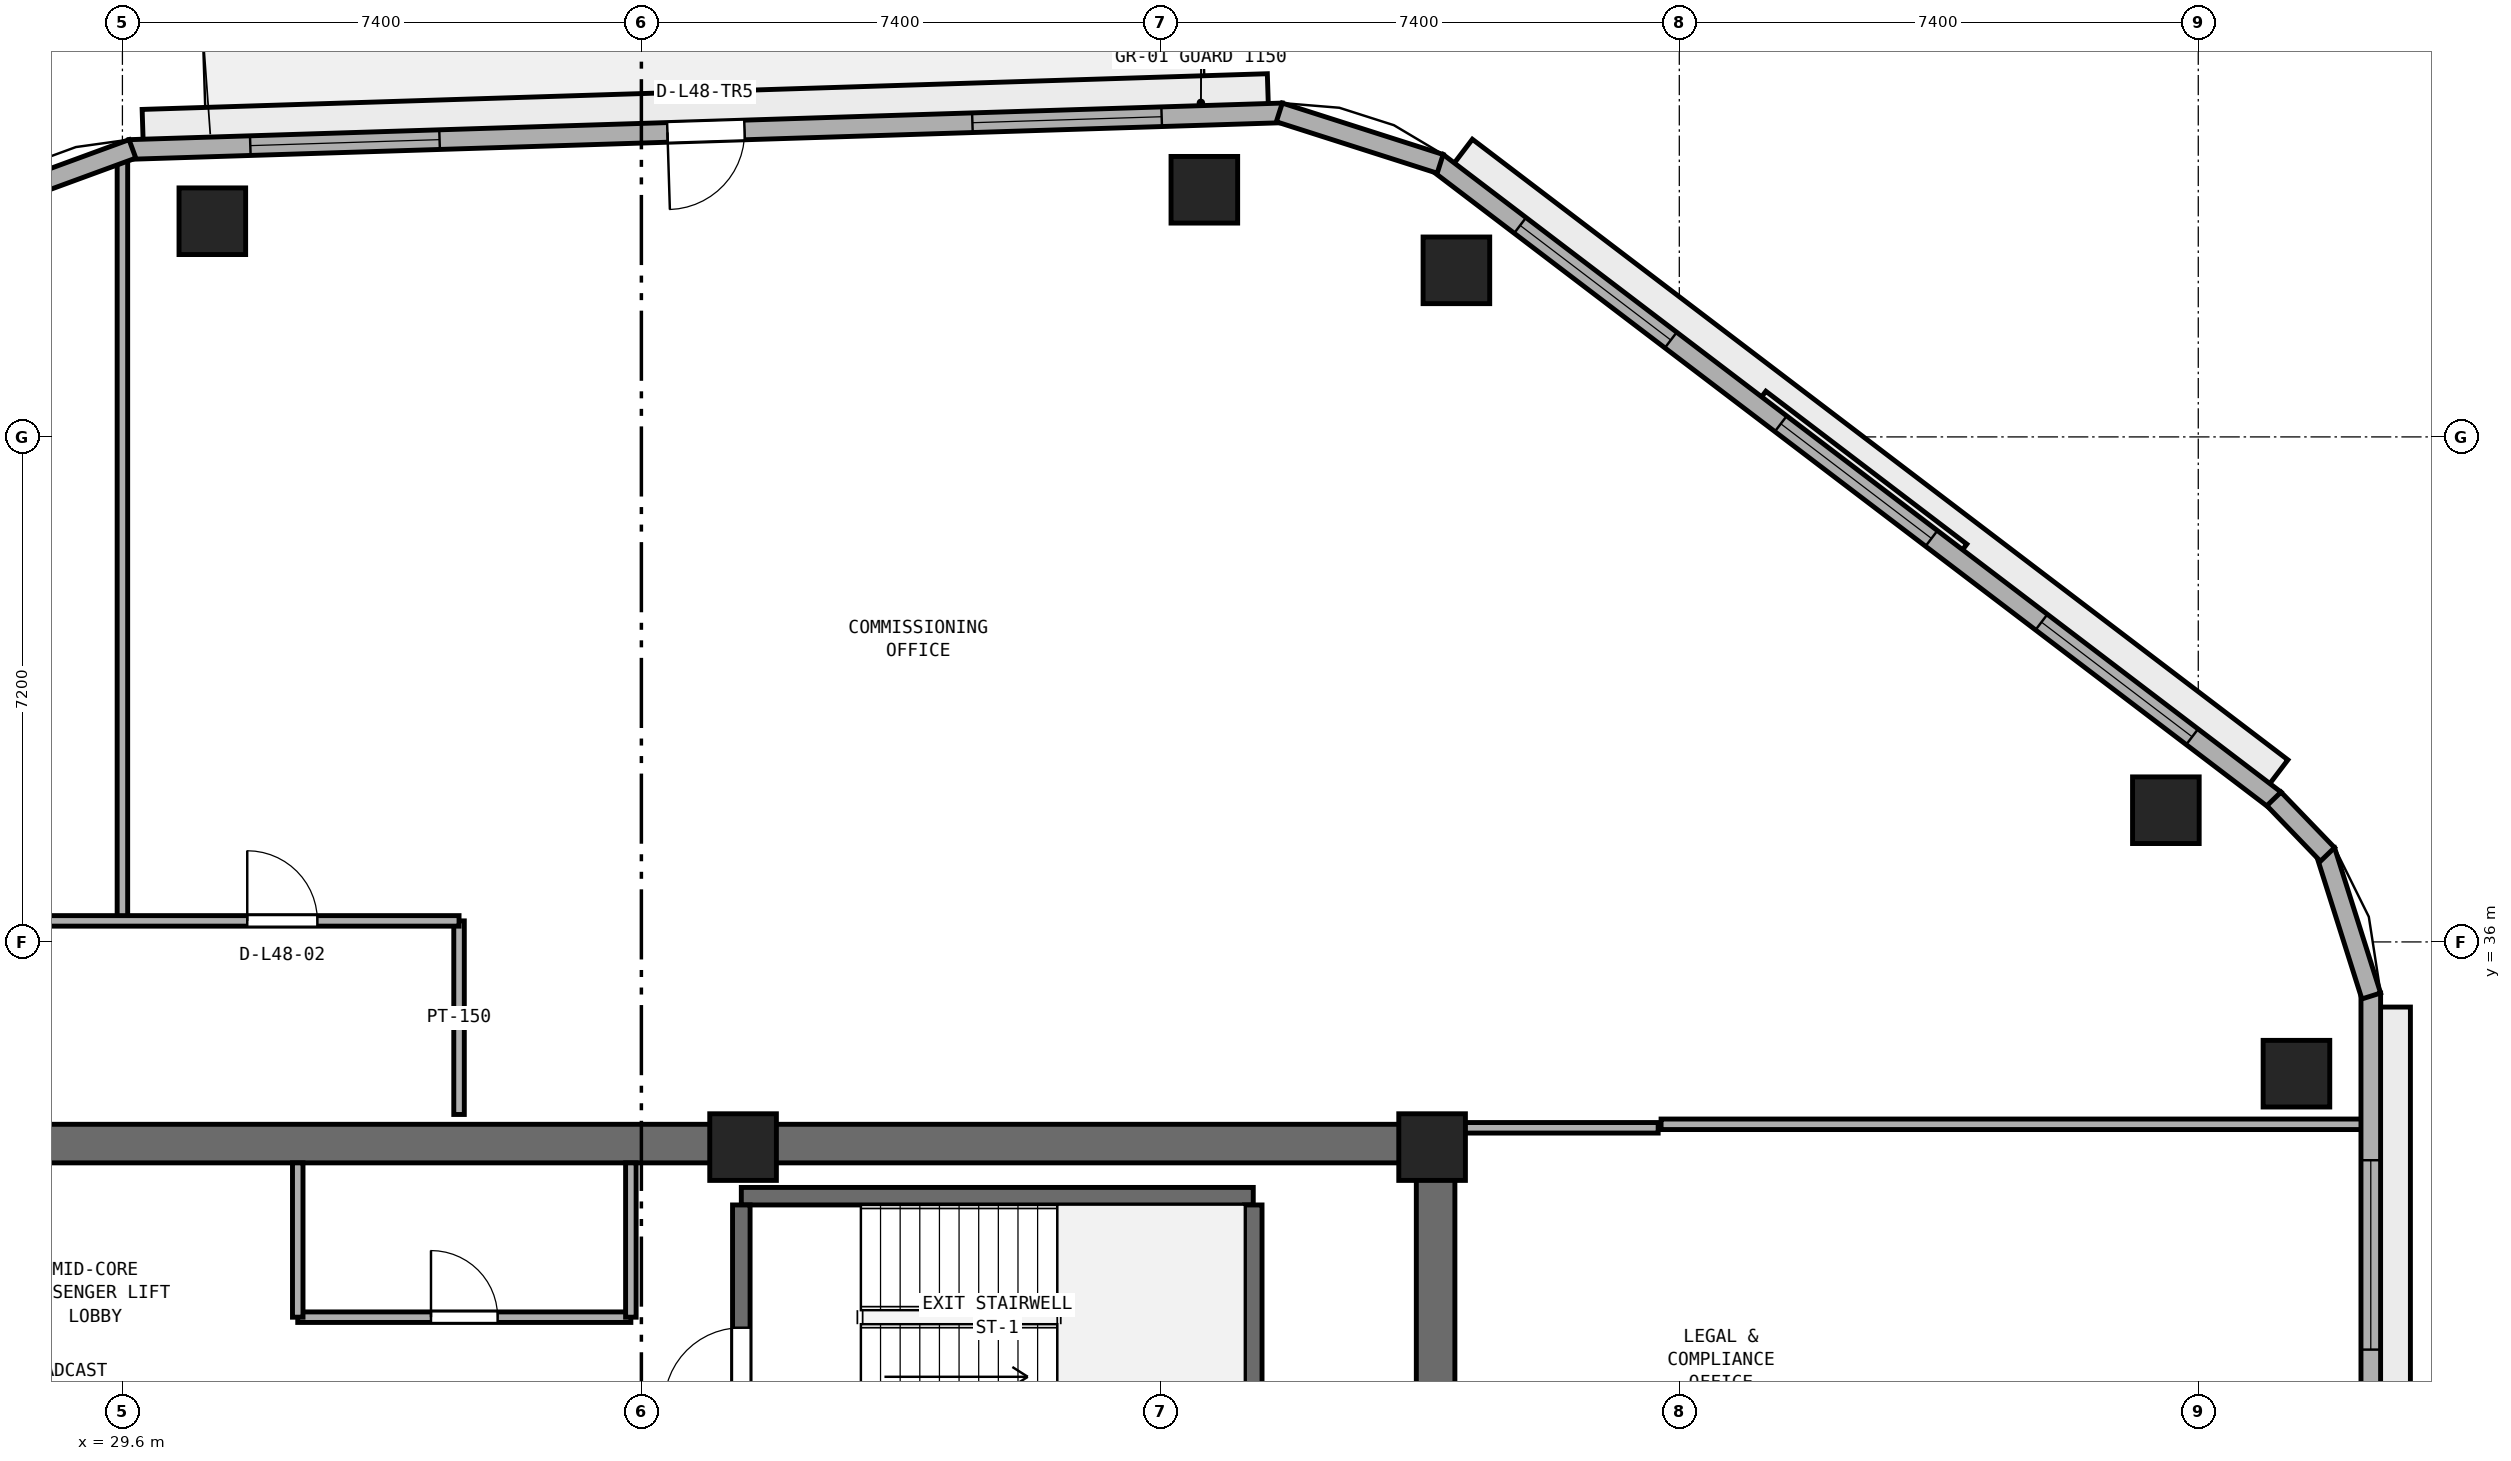
"""IFC4 building model, lengths in metres.
Left out: names, types, materials, properties, quantities, classifications, styles, units other than length and angle.
Written with IfcOpenShell. Run it as: python <this file> out.ifc"""

import sys

from ifc_helpers import new_model, si_unit, direction, frame, frame_2d, origin, origin_2d, place, context, subcontext, project, spatial, rectangle, extrude, element, fill, save


model = new_model("IFC4")
c1 = context("Model", 3, precision=1e-05, world=origin(), true_north=direction((0.0, 1.0)))
c2 = subcontext(c1, "Body", "Model", "MODEL_VIEW")
j1 = project(units=[si_unit("LENGTHUNIT", "METRE"), si_unit("PLANEANGLEUNIT", "RADIAN")], contexts=[c1])
p1 = place(None, origin())
s1 = spatial("IfcSite", under=j1, at=p1, CompositionType="ELEMENT")
p2 = place(p1, origin())
s2 = spatial("IfcBuilding", under=s1, at=p2, CompositionType="ELEMENT")
p3 = place(p2, frame((0.0, 0.0, 189.6)))
s3 = spatial("IfcBuildingStorey", under=s2, at=p3, CompositionType="ELEMENT", Elevation=189.6)
p4 = place(p3, frame((25.4, 33.125, 0.0), z_axis=(0.0, 0.0, 1.0), x_axis=(1.0, 0.0, 0.0)))
e1 = element("IfcWall", 1, at=p4, inside=s3, PredefinedType="SHEAR", context=c2, shape_type="SweptSolid", body=[
    extrude(rectangle(XDim=23.2, YDim=0.55, at=frame_2d((11.6, 0.0))), origin(), (0.0, 0.0, 1.0), 3.54),
])
p5 = place(p3, frame((48.325, 17.55, 0.0), z_axis=(0.0, 0.0, 1.0), x_axis=(0.0, 1.0, 0.0)))
e2 = element("IfcWall", 2, at=p5, inside=s3, PredefinedType="SHEAR", context=c2, shape_type="SweptSolid", body=[
    extrude(rectangle(XDim=15.3, YDim=0.55, at=frame_2d((7.65, 0.0))), origin(), (0.0, 0.0, 1.0), 3.54),
])
p6 = place(p5, frame((5.75, 0.0, 0.0)))
e3 = element("IfcOpeningElement", 3, at=p6, cuts=e2, PredefinedType="OPENING", context=c2, shape_type="SweptSolid", body=[
    extrude(rectangle(XDim=1.5, YDim=2.15, at=frame_2d((0.75, 1.075))), frame((0.0, 0.285, 0.0), z_axis=(0.0, -1.0, 0.0), x_axis=(1.0, 0.0, 0.0)), (0.0, 0.0, 1.0), 0.57),
])
for number, where, z_axis, x_axis in (
    (4, (48.275, 33.075, 0.0), (0.0, 0.0, 1.0), (1.0, 0.0, 0.0)),
    (5, (38.45, 33.075, 0.0), (0.0, 0.0, 1.0), (1.0, 0.0, 0.0)),
):
    element("IfcColumn", number, at=place(p3, frame(where, z_axis=z_axis, x_axis=x_axis)), inside=s3, PredefinedType="PILASTER", context=c2, shape_type="SweptSolid", body=[
        extrude(rectangle(XDim=0.95, YDim=0.95, at=origin_2d()), origin(), (0.0, 0.0, 1.0), 3.8),
    ])
for number, where, z_axis, x_axis in (
    (6, (60.6, 34.122, 0.0), (0.0, 0.0, 1.0), (1.0, 0.0, 0.0)),
    (7, (58.738, 37.878, 0.0), (0.0, 0.0, 1.0), (1.0, 0.0, 0.0)),
    (8, (48.622, 45.575, 0.0), (0.0, 0.0, 1.0), (1.0, 0.0, 0.0)),
    (9, (45.028, 46.724, 0.0), (0.0, 0.0, 1.0), (1.0, 0.0, 0.0)),
    (10, (30.882, 46.275, 0.0), (0.0, 0.0, 1.0), (1.0, 0.0, 0.0)),
):
    element("IfcColumn", number, at=place(p3, frame(where, z_axis=z_axis, x_axis=x_axis)), inside=s3, PredefinedType="COLUMN", context=c2, shape_type="SweptSolid", body=[
        extrude(rectangle(XDim=0.95, YDim=0.95, at=origin_2d()), origin(), (0.0, 0.0, 1.0), 3.8),
    ])
p7 = place(p3, frame((38.425, 32.375, 0.0), z_axis=(0.0, 0.0, 1.0), x_axis=(1.0, 0.0, 0.0)))
e11 = element("IfcWall", 11, at=p7, inside=s3, PredefinedType="SHEAR", context=c2, shape_type="SweptSolid", body=[
    extrude(rectangle(XDim=7.3, YDim=0.25, at=frame_2d((3.65, 0.0))), origin(), (0.0, 0.0, 1.0), 3.54),
])
p8 = place(p3, frame((38.425, 29.05, 0.0), z_axis=(0.0, 0.0, 1.0), x_axis=(0.0, 1.0, 0.0)))
e12 = element("IfcWall", 12, at=p8, inside=s3, PredefinedType="SHEAR", context=c2, shape_type="SweptSolid", body=[
    extrude(rectangle(XDim=3.2, YDim=0.25, at=frame_2d((1.6, 0.0))), origin(), (0.0, 0.0, 1.0), 3.54),
])
p9 = place(p8, frame((0.35, 0.0, 0.0)))
e13 = element("IfcOpeningElement", 13, at=p9, cuts=e12, PredefinedType="OPENING", context=c2, shape_type="SweptSolid", body=[
    extrude(rectangle(XDim=1.1, YDim=2.15, at=frame_2d((0.55, 1.075))), frame((0.0, 0.135, 0.0), z_axis=(0.0, -1.0, 0.0), x_axis=(1.0, 0.0, 0.0)), (0.0, 0.0, 1.0), 0.27),
])
p10 = place(p3, frame((45.725, 29.05, 0.0), z_axis=(0.0, 0.0, 1.0), x_axis=(0.0, 1.0, 0.0)))
e14 = element("IfcWall", 14, at=p10, inside=s3, PredefinedType="SHEAR", context=c2, shape_type="SweptSolid", body=[
    extrude(rectangle(XDim=3.2, YDim=0.25, at=frame_2d((1.6, 0.0))), origin(), (0.0, 0.0, 1.0), 3.54),
])
p11 = place(p3, frame((32.1, 30.65, 0.0), z_axis=(0.0, 0.0, 1.0), x_axis=(1.0, 0.0, 0.0)))
e15 = element("IfcWall", 15, at=p11, inside=s3, PredefinedType="PARTITIONING", context=c2, shape_type="SweptSolid", body=[
    extrude(rectangle(XDim=4.75, YDim=0.15, at=frame_2d((2.375, 0.0))), origin(), (0.0, 0.0, 1.0), 3.54),
])
p12 = place(p11, frame((1.9, 0.0, 0.0)))
e16 = element("IfcOpeningElement", 16, at=p12, cuts=e15, PredefinedType="OPENING", context=c2, shape_type="SweptSolid", body=[
    extrude(rectangle(XDim=0.95, YDim=2.1, at=frame_2d((0.475, 1.05))), frame((0.0, 0.085, 0.0), z_axis=(0.0, -1.0, 0.0), x_axis=(1.0, 0.0, 0.0)), (0.0, 0.0, 1.0), 0.17),
])
for number, where, z_axis, x_axis in (
    (17, (32.1, 30.65, 0.0), (0.0, 0.0, 1.0), (0.0, 1.0, 0.0)),
    (18, (36.85, 30.65, 0.0), (0.0, 0.0, 1.0), (0.0, 1.0, 0.0)),
):
    element("IfcWall", number, at=place(p3, frame(where, z_axis=z_axis, x_axis=x_axis)), inside=s3, PredefinedType="PARTITIONING", context=c2, shape_type="SweptSolid", body=[
        extrude(rectangle(XDim=2.2, YDim=0.15, at=frame_2d((1.1, 0.0))), origin(), (0.0, 0.0, 1.0), 3.54),
    ])
p13 = place(p3, frame((34.4, 33.54, 0.0), z_axis=(0.0, 0.0, 1.0), x_axis=(0.0, 1.0, 0.0)))
e19 = element("IfcWall", 19, at=p13, inside=s3, PredefinedType="PARTITIONING", context=c2, shape_type="SweptSolid", body=[
    extrude(rectangle(XDim=2.76, YDim=0.15, at=frame_2d((1.38, 0.0))), origin(), (0.0, 0.0, 1.0), 3.54),
])
p14 = place(p3, frame((29.6, 36.3, 0.0), z_axis=(0.0, 0.0, 1.0), x_axis=(0.0, 1.0, 0.0)))
e20 = element("IfcWall", 20, at=p14, inside=s3, PredefinedType="PARTITIONING", context=c2, shape_type="SweptSolid", body=[
    extrude(rectangle(XDim=10.919, YDim=0.15, at=frame_2d((5.46, 0.0))), origin(), (0.0, 0.0, 1.0), 3.54),
])
p15 = place(p3, frame((48.74, 33.35, 0.0), z_axis=(0.0, 0.0, 1.0), x_axis=(1.0, 0.0, 0.0)))
e21 = element("IfcWall", 21, at=p15, inside=s3, PredefinedType="PARTITIONING", context=c2, shape_type="SweptSolid", body=[
    extrude(rectangle(XDim=2.759, YDim=0.15, at=frame_2d((1.379, 0.0))), origin(), (0.0, 0.0, 1.0), 2.923),
])
p16 = place(p3, frame((51.54, 33.4, 0.0), z_axis=(0.0, 0.0, 1.0), x_axis=(1.0, 0.0, 0.0)))
e22 = element("IfcWall", 22, at=p16, inside=s3, PredefinedType="PARTITIONING", context=c2, shape_type="SweptSolid", body=[
    extrude(rectangle(XDim=10.055, YDim=0.15, at=frame_2d((5.027, 0.0))), origin(), (0.0, 0.0, 1.0), 2.79),
])
p17 = place(p3, frame((22.5, 36.3, 0.0), z_axis=(0.0, 0.0, 1.0), x_axis=(1.0, 0.0, 0.0)))
e23 = element("IfcWall", 23, at=p17, inside=s3, PredefinedType="PARTITIONING", context=c2, shape_type="SweptSolid", body=[
    extrude(rectangle(XDim=11.9, YDim=0.15, at=frame_2d((5.95, 0.0))), origin(), (0.0, 0.0, 1.0), 3.54),
])
p18 = place(p17, frame((3.17, 0.0, 0.0)))
e24 = element("IfcOpeningElement", 24, at=p18, cuts=e23, PredefinedType="OPENING", context=c2, shape_type="SweptSolid", body=[
    extrude(rectangle(XDim=1.0, YDim=2.12, at=frame_2d((0.5, 1.06))), frame((0.0, 0.085, 0.0), z_axis=(0.0, -1.0, 0.0), x_axis=(1.0, 0.0, 0.0)), (0.0, 0.0, 1.0), 0.17),
])
p19 = place(p17, frame((8.88, 0.0, 0.0)))
e25 = element("IfcOpeningElement", 25, at=p19, cuts=e23, PredefinedType="OPENING", context=c2, shape_type="SweptSolid", body=[
    extrude(rectangle(XDim=1.0, YDim=2.12, at=frame_2d((0.5, 1.06))), frame((0.0, 0.085, 0.0), z_axis=(0.0, -1.0, 0.0), x_axis=(1.0, 0.0, 0.0)), (0.0, 0.0, 1.0), 0.17),
])
p20 = place(p3, frame((61.66, 16.369, 0.0), z_axis=(0.0, 0.0, 1.0), x_axis=(0.0, 1.0, 0.0)))
e26 = element("IfcWall", 26, at=p20, inside=s3, PredefinedType="STANDARD", context=c2, shape_type="SweptSolid", body=[
    extrude(rectangle(XDim=18.902, YDim=0.28, at=frame_2d((9.451, 0.0))), origin(), (0.0, 0.0, 1.0), 3.54),
])
p21 = place(p20, frame((13.819, 0.0, 0.9)))
e27 = element("IfcOpeningElement", 27, at=p21, cuts=e26, PredefinedType="OPENING", context=c2, shape_type="SweptSolid", body=[
    extrude(rectangle(XDim=2.7, YDim=1.75, at=frame_2d((1.35, 0.875))), frame((0.0, 0.15, 0.0), z_axis=(0.0, -1.0, 0.0), x_axis=(1.0, 0.0, 0.0)), (0.0, 0.0, 1.0), 0.3),
])
p22 = place(p3, frame((60.295, 38.025, 0.0), z_axis=(0.0, 0.0, 1.0), x_axis=(-0.795831760834, 0.605517801925, 0.0)))
e28 = element("IfcWall", 28, at=p22, inside=s3, PredefinedType="STANDARD", context=c2, shape_type="SweptSolid", body=[
    extrude(rectangle(XDim=15.012, YDim=0.28, at=frame_2d((7.506, 0.0))), origin(), (0.0, 0.0, 1.0), 3.54),
])
p23 = place(p22, frame((1.485, 0.0, 0.9)))
e29 = element("IfcOpeningElement", 29, at=p23, cuts=e28, PredefinedType="OPENING", context=c2, shape_type="SweptSolid", body=[
    extrude(rectangle(XDim=2.7, YDim=1.75, at=frame_2d((1.35, 0.875))), frame((0.0, 0.15, 0.0), z_axis=(0.0, -1.0, 0.0), x_axis=(1.0, 0.0, 0.0)), (0.0, 0.0, 1.0), 0.3),
])
p24 = place(p22, frame((6.156, 0.0, 0.9)))
e30 = element("IfcOpeningElement", 30, at=p24, cuts=e28, PredefinedType="OPENING", context=c2, shape_type="SweptSolid", body=[
    extrude(rectangle(XDim=2.7, YDim=1.75, at=frame_2d((1.35, 0.875))), frame((0.0, 0.15, 0.0), z_axis=(0.0, -1.0, 0.0), x_axis=(1.0, 0.0, 0.0)), (0.0, 0.0, 1.0), 0.3),
])
p25 = place(p22, frame((10.826, 0.0, 0.9)))
e31 = element("IfcOpeningElement", 31, at=p25, cuts=e28, PredefinedType="OPENING", context=c2, shape_type="SweptSolid", body=[
    extrude(rectangle(XDim=2.7, YDim=1.75, at=frame_2d((1.35, 0.875))), frame((0.0, 0.15, 0.0), z_axis=(0.0, -1.0, 0.0), x_axis=(1.0, 0.0, 0.0)), (0.0, 0.0, 1.0), 0.3),
])
p26 = place(p3, frame((46.143, 47.82, 0.0), z_axis=(0.0, 0.0, 1.0), x_axis=(-0.999497065256, -0.031711457627, 0.0)))
e32 = element("IfcWall", 32, at=p26, inside=s3, PredefinedType="STANDARD", context=c2, shape_type="SweptSolid", body=[
    extrude(rectangle(XDim=16.452, YDim=0.28, at=frame_2d((8.226, 0.0))), origin(), (0.0, 0.0, 1.0), 3.54),
])
p27 = place(p26, frame((7.676, 0.0, 0.0)))
e33 = element("IfcOpeningElement", 33, at=p27, cuts=e32, PredefinedType="OPENING", context=c2, shape_type="SweptSolid", body=[
    extrude(rectangle(XDim=1.1, YDim=2.2, at=frame_2d((0.55, 1.1))), frame((0.0, 0.15, 0.0), z_axis=(0.0, -1.0, 0.0), x_axis=(1.0, 0.0, 0.0)), (0.0, 0.0, 1.0), 0.3),
])
p28 = place(p26, frame((1.725, 0.0, 0.9)))
e34 = element("IfcOpeningElement", 34, at=p28, cuts=e32, PredefinedType="OPENING", context=c2, shape_type="SweptSolid", body=[
    extrude(rectangle(XDim=2.7, YDim=1.75, at=frame_2d((1.35, 0.875))), frame((0.0, 0.15, 0.0), z_axis=(0.0, -1.0, 0.0), x_axis=(1.0, 0.0, 0.0)), (0.0, 0.0, 1.0), 0.3),
])
p29 = place(p26, frame((12.027, 0.0, 0.9)))
e35 = element("IfcOpeningElement", 35, at=p29, cuts=e32, PredefinedType="OPENING", context=c2, shape_type="SweptSolid", body=[
    extrude(rectangle(XDim=2.7, YDim=1.75, at=frame_2d((1.35, 0.875))), frame((0.0, 0.15, 0.0), z_axis=(0.0, -1.0, 0.0), x_axis=(1.0, 0.0, 0.0)), (0.0, 0.0, 1.0), 0.3),
])
p30 = place(p3, frame((61.667, 35.229, 0.0), z_axis=(0.0, 0.0, 1.0), x_axis=(-0.302044777107, 0.953293738898, 0.0)))
e36 = element("IfcWall", 36, at=p30, inside=s3, PredefinedType="STANDARD", context=c2, shape_type="SweptSolid", body=[
    extrude(rectangle(XDim=2.174, YDim=0.28, at=frame_2d((1.087, 0.0))), origin(), (0.0, 0.0, 1.0), 3.54),
])
p31 = place(p3, frame((61.042, 37.247, 0.0), z_axis=(0.0, 0.0, 1.0), x_axis=(-0.694004126367, 0.719971022045, 0.0)))
e37 = element("IfcWall", 37, at=p31, inside=s3, PredefinedType="STANDARD", context=c2, shape_type="SweptSolid", body=[
    extrude(rectangle(XDim=1.1, YDim=0.28, at=frame_2d((0.55, 0.0))), origin(), (0.0, 0.0, 1.0), 3.54),
])
p32 = place(p3, frame((48.39, 47.093, 0.0), z_axis=(0.0, 0.0, 1.0), x_axis=(-0.952542948918, 0.304404222156, 0.0)))
e38 = element("IfcWall", 38, at=p32, inside=s3, PredefinedType="STANDARD", context=c2, shape_type="SweptSolid", body=[
    extrude(rectangle(XDim=2.408, YDim=0.28, at=frame_2d((1.204, 0.0))), origin(), (0.0, 0.0, 1.0), 3.54),
])
p33 = place(p3, frame((29.743, 47.306, 0.0), z_axis=(0.0, 0.0, 1.0), x_axis=(-0.93893328381, -0.344099242302, 0.0)))
e39 = element("IfcWall", 39, at=p33, inside=s3, PredefinedType="STANDARD", context=c2, shape_type="SweptSolid", body=[
    extrude(rectangle(XDim=2.262, YDim=0.28, at=frame_2d((1.131, 0.0))), origin(), (0.0, 0.0, 1.0), 3.54),
])
p34 = place(p9, origin())
e40 = element("IfcDoor", 40, at=p34, inside=s3, OperationType="SINGLE_SWING_LEFT", PredefinedType="DOOR", context=c2, shape_type="SweptSolid", body=[
    extrude(rectangle(XDim=1.1, YDim=2.15, at=frame_2d((0.55, 1.075))), frame((0.0, 0.025, 0.0), z_axis=(0.0, -1.0, 0.0), x_axis=(1.0, 0.0, 0.0)), (0.0, 0.0, 1.0), 0.05),
])
fill(e13, e40)
p35 = place(p12, origin())
e41 = element("IfcDoor", 41, at=p35, inside=s3, OperationType="SINGLE_SWING_LEFT", PredefinedType="DOOR", context=c2, shape_type="SweptSolid", body=[
    extrude(rectangle(XDim=0.95, YDim=2.1, at=frame_2d((0.475, 1.05))), frame((0.0, 0.025, 0.0), z_axis=(0.0, -1.0, 0.0), x_axis=(1.0, 0.0, 0.0)), (0.0, 0.0, 1.0), 0.05),
])
fill(e16, e41)
p36 = place(p19, origin())
e42 = element("IfcDoor", 42, at=p36, inside=s3, OperationType="SINGLE_SWING_LEFT", PredefinedType="DOOR", context=c2, shape_type="SweptSolid", body=[
    extrude(rectangle(XDim=1.0, YDim=2.12, at=frame_2d((0.5, 1.06))), frame((0.0, 0.025, 0.0), z_axis=(0.0, -1.0, 0.0), x_axis=(1.0, 0.0, 0.0)), (0.0, 0.0, 1.0), 0.05),
])
fill(e25, e42)
p37 = place(p21, origin())
e43 = element("IfcWindow", 43, at=p37, inside=s3, PartitioningType="SINGLE_PANEL", PredefinedType="WINDOW", context=c2, shape_type="SweptSolid", body=[
    extrude(rectangle(XDim=2.7, YDim=1.75, at=frame_2d((1.35, 0.875))), frame((0.0, 0.03, 0.0), z_axis=(0.0, -1.0, 0.0), x_axis=(1.0, 0.0, 0.0)), (0.0, 0.0, 1.0), 0.06),
])
fill(e27, e43)
p38 = place(p23, origin())
e44 = element("IfcWindow", 44, at=p38, inside=s3, PartitioningType="SINGLE_PANEL", PredefinedType="WINDOW", context=c2, shape_type="SweptSolid", body=[
    extrude(rectangle(XDim=2.7, YDim=1.75, at=frame_2d((1.35, 0.875))), frame((0.0, 0.03, 0.0), z_axis=(0.0, -1.0, 0.0), x_axis=(1.0, 0.0, 0.0)), (0.0, 0.0, 1.0), 0.06),
])
fill(e29, e44)
p39 = place(p24, origin())
e45 = element("IfcWindow", 45, at=p39, inside=s3, PartitioningType="SINGLE_PANEL", PredefinedType="WINDOW", context=c2, shape_type="SweptSolid", body=[
    extrude(rectangle(XDim=2.7, YDim=1.75, at=frame_2d((1.35, 0.875))), frame((0.0, 0.03, 0.0), z_axis=(0.0, -1.0, 0.0), x_axis=(1.0, 0.0, 0.0)), (0.0, 0.0, 1.0), 0.06),
])
fill(e30, e45)
p40 = place(p25, origin())
e46 = element("IfcWindow", 46, at=p40, inside=s3, PartitioningType="SINGLE_PANEL", PredefinedType="WINDOW", context=c2, shape_type="SweptSolid", body=[
    extrude(rectangle(XDim=2.7, YDim=1.75, at=frame_2d((1.35, 0.875))), frame((0.0, 0.03, 0.0), z_axis=(0.0, -1.0, 0.0), x_axis=(1.0, 0.0, 0.0)), (0.0, 0.0, 1.0), 0.06),
])
fill(e31, e46)
p41 = place(p27, origin())
e47 = element("IfcDoor", 47, at=p41, inside=s3, OperationType="SINGLE_SWING_RIGHT", PredefinedType="DOOR", context=c2, shape_type="SweptSolid", body=[
    extrude(rectangle(XDim=1.1, YDim=2.2, at=frame_2d((0.55, 1.1))), frame((0.0, 0.025, 0.0), z_axis=(0.0, -1.0, 0.0), x_axis=(1.0, 0.0, 0.0)), (0.0, 0.0, 1.0), 0.05),
])
fill(e33, e47)
p42 = place(p28, origin())
e48 = element("IfcWindow", 48, at=p42, inside=s3, PartitioningType="SINGLE_PANEL", PredefinedType="WINDOW", context=c2, shape_type="SweptSolid", body=[
    extrude(rectangle(XDim=2.7, YDim=1.75, at=frame_2d((1.35, 0.875))), frame((0.0, 0.03, 0.0), z_axis=(0.0, -1.0, 0.0), x_axis=(1.0, 0.0, 0.0)), (0.0, 0.0, 1.0), 0.06),
])
fill(e34, e48)
p43 = place(p29, origin())
e49 = element("IfcWindow", 49, at=p43, inside=s3, PartitioningType="SINGLE_PANEL", PredefinedType="WINDOW", context=c2, shape_type="SweptSolid", body=[
    extrude(rectangle(XDim=2.7, YDim=1.75, at=frame_2d((1.35, 0.875))), frame((0.0, 0.03, 0.0), z_axis=(0.0, -1.0, 0.0), x_axis=(1.0, 0.0, 0.0)), (0.0, 0.0, 1.0), 0.06),
])
fill(e35, e49)
save(model, sys.argv[1])
